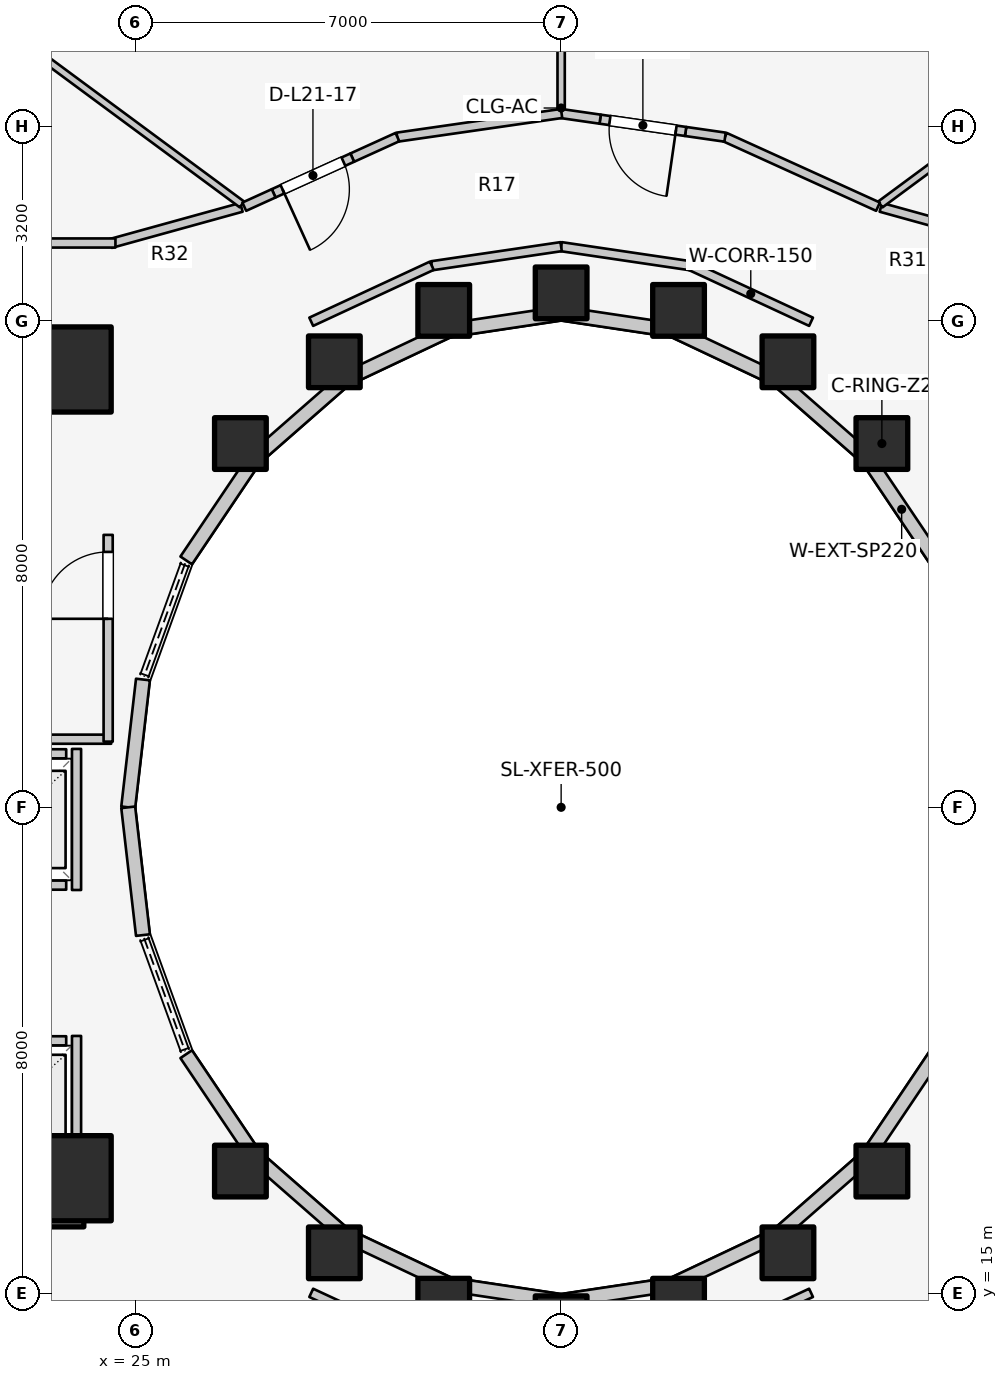
"""IFC4 building model, lengths in metres.
Left out: names, types, materials, properties, quantities, classifications, styles, units other than length and angle.
Written with IfcOpenShell. Run it as: python <this file> out.ifc"""

import sys

from ifc_helpers import new_model, si_unit, direction, frame, frame_2d, origin, origin_2d, place, context, subcontext, project, spatial, rectangle, extrude, element, fill, save


model = new_model("IFC4")
c1 = context("Model", 3, precision=1e-05, world=origin(), true_north=direction((0.0, 1.0)))
c2 = subcontext(c1, "Body", "Model", "MODEL_VIEW")
j1 = project(units=[si_unit("LENGTHUNIT", "METRE"), si_unit("PLANEANGLEUNIT", "RADIAN")], contexts=[c1])
p1 = place(None, origin())
s1 = spatial("IfcSite", under=j1, at=p1, CompositionType="ELEMENT")
p2 = place(p1, origin())
s2 = spatial("IfcBuilding", under=s1, at=p2, CompositionType="ELEMENT")
p3 = place(p2, frame((0.0, 0.0, 73.2)))
s3 = spatial("IfcBuildingStorey", under=s2, at=p3, CompositionType="ELEMENT", Elevation=73.2)
for number, where, z_axis, x_axis in (
    (1, (19.65, 16.55, 0.0), (0.0, 0.0, 1.0), (1.0, 0.0, 0.0)),
    (2, (19.65, 30.35, 0.0), (0.0, 0.0, 1.0), (1.0, 0.0, 0.0)),
):
    element("IfcWall", number, at=place(p3, frame(where, z_axis=z_axis, x_axis=x_axis)), inside=s3, PredefinedType="SHEAR", context=c2, shape_type="SweptSolid", body=[
        extrude(rectangle(XDim=4.5, YDim=0.9, at=frame_2d((2.25, 0.0))), origin(), (0.0, 0.0, 1.0), 3.1),
    ])
for number, where, z_axis, x_axis in (
    (3, (23.9, 16.9, 0.0), (0.0, 0.0, 1.0), (1.0, 0.0, 0.0)),
    (4, (23.9, 30.2, 0.0), (0.0, 0.0, 1.0), (1.0, 0.0, 0.0)),
):
    element("IfcColumn", number, at=place(p3, frame(where, z_axis=z_axis, x_axis=x_axis)), inside=s3, PredefinedType="COLUMN", context=c2, shape_type="SweptSolid", body=[
        extrude(rectangle(XDim=1.4, YDim=1.4, at=origin_2d()), origin(), (0.0, 0.0, 1.0), 3.1),
    ])
for number, where, z_axis, x_axis in (
    (5, (37.275, 28.982, 0.0), (0.0, 0.0, 1.0), (1.0, 0.0, 0.0)),
    (6, (35.73, 30.327, 0.0), (0.0, 0.0, 1.0), (1.0, 0.0, 0.0)),
    (7, (33.931, 31.172, 0.0), (0.0, 0.0, 1.0), (1.0, 0.0, 0.0)),
    (8, (32.0, 31.46, 0.0), (0.0, 0.0, 1.0), (1.0, 0.0, 0.0)),
    (9, (30.069, 31.172, 0.0), (0.0, 0.0, 1.0), (1.0, 0.0, 0.0)),
    (10, (28.27, 30.327, 0.0), (0.0, 0.0, 1.0), (1.0, 0.0, 0.0)),
    (11, (26.725, 28.982, 0.0), (0.0, 0.0, 1.0), (1.0, 0.0, 0.0)),
    (12, (26.725, 17.018, 0.0), (0.0, 0.0, 1.0), (1.0, 0.0, 0.0)),
    (13, (28.27, 15.673, 0.0), (0.0, 0.0, 1.0), (1.0, 0.0, 0.0)),
    (14, (30.069, 14.828, 0.0), (0.0, 0.0, 1.0), (1.0, 0.0, 0.0)),
    (15, (32.0, 14.54, 0.0), (0.0, 0.0, 1.0), (1.0, 0.0, 0.0)),
    (16, (33.931, 14.828, 0.0), (0.0, 0.0, 1.0), (1.0, 0.0, 0.0)),
    (17, (35.73, 15.673, 0.0), (0.0, 0.0, 1.0), (1.0, 0.0, 0.0)),
    (18, (37.275, 17.018, 0.0), (0.0, 0.0, 1.0), (1.0, 0.0, 0.0)),
):
    element("IfcColumn", number, at=place(p3, frame(where, z_axis=z_axis, x_axis=x_axis)), inside=s3, PredefinedType="COLUMN", context=c2, shape_type="SweptSolid", body=[
        extrude(rectangle(XDim=0.85, YDim=0.85, at=origin_2d()), origin(), (0.0, 0.0, 1.0), 3.1),
    ])
p4 = place(p3, frame((38.166, 27.06, 0.0), z_axis=(0.0, 0.0, 1.0), x_axis=(-0.558197800898, 0.829707909492, 0.0)))
e19 = element("IfcWall", 19, at=p4, inside=s3, PredefinedType="STANDARD", context=c2, shape_type="SweptSolid", body=[
    extrude(rectangle(XDim=2.027, YDim=0.23, at=frame_2d((1.013, 0.0))), origin(), (0.0, 0.0, 1.0), 1.22),
])
p5 = place(p3, frame((37.035, 28.742, 0.0), z_axis=(0.0, 0.0, 1.0), x_axis=(-0.752576694707, 0.658504607869, 0.0)))
e20 = element("IfcWall", 20, at=p5, inside=s3, PredefinedType="STANDARD", context=c2, shape_type="SweptSolid", body=[
    extrude(rectangle(XDim=1.959, YDim=0.23, at=frame_2d((0.98, 0.0))), origin(), (0.0, 0.0, 1.0), 1.22),
])
p6 = place(p3, frame((35.56, 30.032, 0.0), z_axis=(0.0, 0.0, 1.0), x_axis=(-0.904179699603, 0.427152280606, 0.0)))
e21 = element("IfcWall", 21, at=p6, inside=s3, PredefinedType="STANDARD", context=c2, shape_type="SweptSolid", body=[
    extrude(rectangle(XDim=1.899, YDim=0.23, at=frame_2d((0.95, 0.0))), origin(), (0.0, 0.0, 1.0), 1.22),
])
for number, where, z_axis, x_axis in (
    (22, (33.843, 30.843, 0.0), (0.0, 0.0, 1.0), (-0.989, 0.149, 0.0)),
    (23, (32.0, 31.12, 0.0), (0.0, 0.0, 1.0), (-0.989, -0.149, 0.0)),
):
    element("IfcWall", number, at=place(p3, frame(where, z_axis=z_axis, x_axis=x_axis)), inside=s3, PredefinedType="STANDARD", context=c2, shape_type="SweptSolid", body=[
        extrude(rectangle(XDim=1.864, YDim=0.23, at=frame_2d((0.932, 0.0))), origin(), (0.0, 0.0, 1.0), 1.22),
    ])
p7 = place(p3, frame((30.157, 30.843, 0.0), z_axis=(0.0, 0.0, 1.0), x_axis=(-0.904179699603, -0.427152280606, 0.0)))
e24 = element("IfcWall", 24, at=p7, inside=s3, PredefinedType="STANDARD", context=c2, shape_type="SweptSolid", body=[
    extrude(rectangle(XDim=1.899, YDim=0.23, at=frame_2d((0.95, 0.0))), origin(), (0.0, 0.0, 1.0), 1.22),
])
p8 = place(p3, frame((28.44, 30.032, 0.0), z_axis=(0.0, 0.0, 1.0), x_axis=(-0.752576694707, -0.658504607869, 0.0)))
e25 = element("IfcWall", 25, at=p8, inside=s3, PredefinedType="STANDARD", context=c2, shape_type="SweptSolid", body=[
    extrude(rectangle(XDim=1.959, YDim=0.23, at=frame_2d((0.98, 0.0))), origin(), (0.0, 0.0, 1.0), 1.22),
])
p9 = place(p3, frame((26.965, 28.742, 0.0), z_axis=(0.0, 0.0, 1.0), x_axis=(-0.558197800898, -0.829707909492, 0.0)))
e26 = element("IfcWall", 26, at=p9, inside=s3, PredefinedType="STANDARD", context=c2, shape_type="SweptSolid", body=[
    extrude(rectangle(XDim=2.027, YDim=0.23, at=frame_2d((1.013, 0.0))), origin(), (0.0, 0.0, 1.0), 1.22),
])
for number, where, z_axis, x_axis in (
    (27, (25.123, 25.102, 0.0), (0.0, 0.0, 1.0), (-0.115, -0.993, 0.0)),
    (28, (24.88, 23.0, 0.0), (0.0, 0.0, 1.0), (0.115, -0.993, 0.0)),
):
    element("IfcWall", number, at=place(p3, frame(where, z_axis=z_axis, x_axis=x_axis)), inside=s3, PredefinedType="STANDARD", context=c2, shape_type="SweptSolid", body=[
        extrude(rectangle(XDim=2.115, YDim=0.23, at=frame_2d((1.058, 0.0))), origin(), (0.0, 0.0, 1.0), 2.56),
    ])
p10 = place(p3, frame((25.834, 18.94, 0.0), z_axis=(0.0, 0.0, 1.0), x_axis=(0.558197800898, -0.829707909492, 0.0)))
e29 = element("IfcWall", 29, at=p10, inside=s3, PredefinedType="STANDARD", context=c2, shape_type="SweptSolid", body=[
    extrude(rectangle(XDim=2.027, YDim=0.23, at=frame_2d((1.013, 0.0))), origin(), (0.0, 0.0, 1.0), 1.22),
])
p11 = place(p3, frame((26.965, 17.258, 0.0), z_axis=(0.0, 0.0, 1.0), x_axis=(0.752576694707, -0.658504607869, 0.0)))
e30 = element("IfcWall", 30, at=p11, inside=s3, PredefinedType="STANDARD", context=c2, shape_type="SweptSolid", body=[
    extrude(rectangle(XDim=1.959, YDim=0.23, at=frame_2d((0.98, 0.0))), origin(), (0.0, 0.0, 1.0), 1.22),
])
p12 = place(p3, frame((28.44, 15.968, 0.0), z_axis=(0.0, 0.0, 1.0), x_axis=(0.904179699603, -0.427152280606, 0.0)))
e31 = element("IfcWall", 31, at=p12, inside=s3, PredefinedType="STANDARD", context=c2, shape_type="SweptSolid", body=[
    extrude(rectangle(XDim=1.899, YDim=0.23, at=frame_2d((0.95, 0.0))), origin(), (0.0, 0.0, 1.0), 1.22),
])
for number, where, z_axis, x_axis in (
    (32, (30.157, 15.157, 0.0), (0.0, 0.0, 1.0), (0.989, -0.149, 0.0)),
    (33, (32.0, 14.88, 0.0), (0.0, 0.0, 1.0), (0.989, 0.149, 0.0)),
):
    element("IfcWall", number, at=place(p3, frame(where, z_axis=z_axis, x_axis=x_axis)), inside=s3, PredefinedType="STANDARD", context=c2, shape_type="SweptSolid", body=[
        extrude(rectangle(XDim=1.864, YDim=0.23, at=frame_2d((0.932, 0.0))), origin(), (0.0, 0.0, 1.0), 1.22),
    ])
p13 = place(p3, frame((33.843, 15.157, 0.0), z_axis=(0.0, 0.0, 1.0), x_axis=(0.904179699603, 0.427152280606, 0.0)))
e34 = element("IfcWall", 34, at=p13, inside=s3, PredefinedType="STANDARD", context=c2, shape_type="SweptSolid", body=[
    extrude(rectangle(XDim=1.899, YDim=0.23, at=frame_2d((0.95, 0.0))), origin(), (0.0, 0.0, 1.0), 1.22),
])
p14 = place(p3, frame((35.56, 15.968, 0.0), z_axis=(0.0, 0.0, 1.0), x_axis=(0.752576694707, 0.658504607869, 0.0)))
e35 = element("IfcWall", 35, at=p14, inside=s3, PredefinedType="STANDARD", context=c2, shape_type="SweptSolid", body=[
    extrude(rectangle(XDim=1.959, YDim=0.23, at=frame_2d((0.98, 0.0))), origin(), (0.0, 0.0, 1.0), 1.22),
])
p15 = place(p3, frame((37.035, 17.258, 0.0), z_axis=(0.0, 0.0, 1.0), x_axis=(0.558197800898, 0.829707909492, 0.0)))
e36 = element("IfcWall", 36, at=p15, inside=s3, PredefinedType="STANDARD", context=c2, shape_type="SweptSolid", body=[
    extrude(rectangle(XDim=2.027, YDim=0.23, at=frame_2d((1.013, 0.0))), origin(), (0.0, 0.0, 1.0), 1.22),
])
p16 = place(p3, frame((22.04, 19.16, 0.0), z_axis=(0.0, 0.0, 1.0), x_axis=(1.0, 0.0, 0.0)))
e37 = element("IfcWall", 37, at=p16, inside=s3, PredefinedType="SOLIDWALL", context=c2, shape_type="SweptSolid", body=[
    extrude(rectangle(XDim=1.82, YDim=0.15, at=frame_2d((0.91, 0.0))), origin(), (0.0, 0.0, 1.0), 2.12),
])
p17 = place(p16, frame((0.36, 0.0, 0.0)))
e38 = element("IfcOpeningElement", 38, at=p17, cuts=e37, PredefinedType="OPENING", context=c2, shape_type="SweptSolid", body=[
    extrude(rectangle(XDim=1.1, YDim=2.1, at=frame_2d((0.55, 1.05))), frame((0.0, 0.085, 0.0), z_axis=(0.0, -1.0, 0.0), x_axis=(1.0, 0.0, 0.0)), (0.0, 0.0, 1.0), 0.17),
])
p18 = place(p3, frame((22.04, 17.1, 0.0), z_axis=(0.0, 0.0, 1.0), x_axis=(1.0, 0.0, 0.0)))
e39 = element("IfcWall", 39, at=p18, inside=s3, PredefinedType="SOLIDWALL", context=c2, shape_type="SweptSolid", body=[
    extrude(rectangle(XDim=1.82, YDim=0.15, at=frame_2d((0.91, 0.0))), origin(), (0.0, 0.0, 1.0), 2.12),
])
p19 = place(p3, frame((24.03, 17.02, 0.0), z_axis=(0.0, 0.0, 1.0), x_axis=(0.0, 1.0, 0.0)))
e40 = element("IfcWall", 40, at=p19, inside=s3, PredefinedType="SOLIDWALL", context=c2, shape_type="SweptSolid", body=[
    extrude(rectangle(XDim=2.22, YDim=0.15, at=frame_2d((1.11, 0.0))), origin(), (0.0, 0.0, 1.0), 1.873),
])
p20 = place(p3, frame((22.04, 21.72, 0.0), z_axis=(0.0, 0.0, 1.0), x_axis=(1.0, 0.0, 0.0)))
e41 = element("IfcWall", 41, at=p20, inside=s3, PredefinedType="SOLIDWALL", context=c2, shape_type="SweptSolid", body=[
    extrude(rectangle(XDim=1.82, YDim=0.15, at=frame_2d((0.91, 0.0))), origin(), (0.0, 0.0, 1.0), 2.12),
])
p21 = place(p20, frame((0.36, 0.0, 0.0)))
e42 = element("IfcOpeningElement", 42, at=p21, cuts=e41, PredefinedType="OPENING", context=c2, shape_type="SweptSolid", body=[
    extrude(rectangle(XDim=1.1, YDim=2.1, at=frame_2d((0.55, 1.05))), frame((0.0, 0.085, 0.0), z_axis=(0.0, -1.0, 0.0), x_axis=(1.0, 0.0, 0.0)), (0.0, 0.0, 1.0), 0.17),
])
p22 = place(p3, frame((22.04, 23.88, 0.0), z_axis=(0.0, 0.0, 1.0), x_axis=(1.0, 0.0, 0.0)))
e43 = element("IfcWall", 43, at=p22, inside=s3, PredefinedType="SOLIDWALL", context=c2, shape_type="SweptSolid", body=[
    extrude(rectangle(XDim=1.82, YDim=0.15, at=frame_2d((0.91, 0.0))), origin(), (0.0, 0.0, 1.0), 2.12),
])
p23 = place(p3, frame((24.03, 21.64, 0.0), z_axis=(0.0, 0.0, 1.0), x_axis=(0.0, 1.0, 0.0)))
e44 = element("IfcWall", 44, at=p23, inside=s3, PredefinedType="SOLIDWALL", context=c2, shape_type="SweptSolid", body=[
    extrude(rectangle(XDim=2.32, YDim=0.15, at=frame_2d((1.16, 0.0))), origin(), (0.0, 0.0, 1.0), 2.12),
])
p24 = place(p3, frame((19.52, 24.12, 0.0), z_axis=(0.0, 0.0, 1.0), x_axis=(1.0, 0.0, 0.0)))
e45 = element("IfcWall", 45, at=p24, inside=s3, PredefinedType="PARTITIONING", context=c2, shape_type="SweptSolid", body=[
    extrude(rectangle(XDim=5.08, YDim=0.15, at=frame_2d((2.54, 0.0))), origin(), (0.0, 0.0, 1.0), 2.12),
])
p25 = place(p3, frame((24.55, 24.08, 0.0), z_axis=(0.0, 0.0, 1.0), x_axis=(0.0, 1.0, 0.0)))
e46 = element("IfcWall", 46, at=p25, inside=s3, PredefinedType="PARTITIONING", context=c2, shape_type="SweptSolid", body=[
    extrude(rectangle(XDim=3.4, YDim=0.15, at=frame_2d((1.7, 0.0))), origin(), (0.0, 0.0, 1.0), 2.575),
])
p26 = place(p25, frame((2.02, 0.0, 0.0)))
e47 = element("IfcOpeningElement", 47, at=p26, cuts=e46, PredefinedType="OPENING", context=c2, shape_type="SweptSolid", body=[
    extrude(rectangle(XDim=1.1, YDim=2.1, at=frame_2d((0.55, 1.05))), frame((0.0, 0.085, 0.0), z_axis=(0.0, -1.0, 0.0), x_axis=(1.0, 0.0, 0.0)), (0.0, 0.0, 1.0), 0.17),
])
p27 = place(p3, frame((36.11, 30.985, 0.0), z_axis=(0.0, 0.0, 1.0), x_axis=(-0.906943449489, 0.421252393975, 0.0)))
e48 = element("IfcWall", 48, at=p27, inside=s3, PredefinedType="PARTITIONING", context=c2, shape_type="SweptSolid", body=[
    extrude(rectangle(XDim=2.186, YDim=0.15, at=frame_2d((1.093, 0.0))), origin(), (0.0, 0.0, 1.0), 1.992),
])
for number, where, z_axis, x_axis in (
    (49, (34.127, 31.906, 0.0), (0.0, 0.0, 1.0), (-0.989, 0.146, 0.0)),
    (50, (32.0, 32.22, 0.0), (0.0, 0.0, 1.0), (-0.989, -0.146, 0.0)),
):
    element("IfcWall", number, at=place(p3, frame(where, z_axis=z_axis, x_axis=x_axis)), inside=s3, PredefinedType="PARTITIONING", context=c2, shape_type="SweptSolid", body=[
        extrude(rectangle(XDim=2.151, YDim=0.15, at=frame_2d((1.075, 0.0))), origin(), (0.0, 0.0, 1.0), 1.992),
    ])
p28 = place(p3, frame((29.873, 31.906, 0.0), z_axis=(0.0, 0.0, 1.0), x_axis=(-0.906943449489, -0.421252393975, 0.0)))
e51 = element("IfcWall", 51, at=p28, inside=s3, PredefinedType="PARTITIONING", context=c2, shape_type="SweptSolid", body=[
    extrude(rectangle(XDim=2.186, YDim=0.15, at=frame_2d((1.093, 0.0))), origin(), (0.0, 0.0, 1.0), 1.992),
])
for number, where, z_axis, x_axis in (
    (52, (27.89, 15.015, 0.0), (0.0, 0.0, 1.0), (0.907, -0.421, 0.0)),
    (53, (34.127, 14.094, 0.0), (0.0, 0.0, 1.0), (0.907, 0.421, 0.0)),
):
    element("IfcWall", number, at=place(p3, frame(where, z_axis=z_axis, x_axis=x_axis)), inside=s3, PredefinedType="PARTITIONING", context=c2, shape_type="SweptSolid", body=[
        extrude(rectangle(XDim=2.186, YDim=0.15, at=frame_2d((1.093, 0.0))), origin(), (0.0, 0.0, 1.0), 1.22),
    ])
for number, where, z_axis, x_axis in (
    (54, (37.258, 32.867, 0.0), (0.0, 0.0, 1.0), (0.964, -0.267, 0.0)),
    (55, (26.742, 32.867, 0.0), (0.0, 0.0, 1.0), (-0.964, -0.267, 0.0)),
):
    element("IfcWall", number, at=place(p3, frame(where, z_axis=z_axis, x_axis=x_axis)), inside=s3, PredefinedType="PARTITIONING", context=c2, shape_type="SweptSolid", body=[
        extrude(rectangle(XDim=2.232, YDim=0.15, at=frame_2d((1.116, 0.0))), origin(), (0.0, 0.0, 1.0), 1.992),
    ])
p29 = place(p3, frame((19.51, 32.28, 0.0), z_axis=(0.0, 0.0, 1.0), x_axis=(1.0, 0.0, 0.0)))
e56 = element("IfcWall", 56, at=p29, inside=s3, PredefinedType="PARTITIONING", context=c2, shape_type="SweptSolid", body=[
    extrude(rectangle(XDim=5.16, YDim=0.15, at=frame_2d((2.58, 0.0))), origin(), (0.0, 0.0, 1.0), 1.992),
])
p30 = place(p3, frame((37.249, 32.914, 0.0), z_axis=(0.0, 0.0, 1.0), x_axis=(0.80430981394, 0.594210167533, 0.0)))
e57 = element("IfcWall", 57, at=p30, inside=s3, PredefinedType="MOVABLE", context=c2, shape_type="SweptSolid", body=[
    extrude(rectangle(XDim=9.146, YDim=0.12, at=frame_2d((4.573, 0.0))), origin(), (0.0, 0.0, 1.0), 1.22),
])
p31 = place(p3, frame((32.0, 34.465, 0.0), z_axis=(0.0, 0.0, 1.0), x_axis=(0.0, 1.0, 0.0)))
e58 = element("IfcWall", 58, at=p31, inside=s3, PredefinedType="MOVABLE", context=c2, shape_type="SweptSolid", body=[
    extrude(rectangle(XDim=6.91, YDim=0.12, at=frame_2d((3.455, 0.0))), origin(), (0.0, 0.0, 1.0), 1.22),
])
p32 = place(p3, frame((26.751, 32.914, 0.0), z_axis=(0.0, 0.0, 1.0), x_axis=(-0.80430981394, 0.594210167533, 0.0)))
e59 = element("IfcWall", 59, at=p32, inside=s3, PredefinedType="MOVABLE", context=c2, shape_type="SweptSolid", body=[
    extrude(rectangle(XDim=9.146, YDim=0.12, at=frame_2d((4.573, 0.0))), origin(), (0.0, 0.0, 1.0), 1.22),
])
p33 = place(p3, frame((37.211, 32.877, 0.0), z_axis=(0.0, 0.0, 1.0), x_axis=(-0.910435980343, 0.413650003865, 0.0)))
e60 = element("IfcWall", 60, at=p33, inside=s3, PredefinedType="PARTITIONING", context=c2, shape_type="SweptSolid", body=[
    extrude(rectangle(XDim=2.766, YDim=0.15, at=frame_2d((1.383, 0.0))), origin(), (0.0, 0.0, 1.0), 1.992),
])
p34 = place(p3, frame((34.696, 34.021, 0.0), z_axis=(0.0, 0.0, 1.0), x_axis=(-0.989829975321, 0.142255474256, 0.0)))
e61 = element("IfcWall", 61, at=p34, inside=s3, PredefinedType="PARTITIONING", context=c2, shape_type="SweptSolid", body=[
    extrude(rectangle(XDim=0.656, YDim=0.15, at=frame_2d((0.328, 0.0))), origin(), (0.0, 0.0, 1.0), 2.575),
])
p35 = place(p3, frame((34.047, 34.114, 0.0), z_axis=(0.0, 0.0, 1.0), x_axis=(-0.98979070052, 0.142528485449, 0.0)))
e62 = element("IfcWall", 62, at=p35, inside=s3, PredefinedType="PARTITIONING", context=c2, shape_type="SweptSolid", body=[
    extrude(rectangle(XDim=1.42, YDim=0.15, at=frame_2d((0.71, 0.0))), origin(), (0.0, 0.0, 1.0), 2.575),
])
p36 = place(p35, frame((0.16, 0.0, 0.0)))
e63 = element("IfcOpeningElement", 63, at=p36, cuts=e62, PredefinedType="OPENING", context=c2, shape_type="SweptSolid", body=[
    extrude(rectangle(XDim=1.1, YDim=2.1, at=frame_2d((0.55, 1.05))), frame((0.0, 0.085, 0.0), z_axis=(0.0, -1.0, 0.0), x_axis=(1.0, 0.0, 0.0)), (0.0, 0.0, 1.0), 0.17),
])
p37 = place(p3, frame((32.642, 34.316, 0.0), z_axis=(0.0, 0.0, 1.0), x_axis=(-0.989777474181, 0.142620305723, 0.0)))
e64 = element("IfcWall", 64, at=p37, inside=s3, PredefinedType="PARTITIONING", context=c2, shape_type="SweptSolid", body=[
    extrude(rectangle(XDim=0.656, YDim=0.15, at=frame_2d((0.328, 0.0))), origin(), (0.0, 0.0, 1.0), 1.992),
])
p38 = place(p3, frame((32.007, 34.41, 0.0), z_axis=(0.0, 0.0, 1.0), x_axis=(-0.989796962007, -0.142484995705, 0.0)))
e65 = element("IfcWall", 65, at=p38, inside=s3, PredefinedType="PARTITIONING", context=c2, shape_type="SweptSolid", body=[
    extrude(rectangle(XDim=2.731, YDim=0.15, at=frame_2d((1.366, 0.0))), origin(), (0.0, 0.0, 1.0), 1.992),
])
p39 = place(p3, frame((29.307, 34.022, 0.0), z_axis=(0.0, 0.0, 1.0), x_axis=(-0.910335729505, -0.413870583138, 0.0)))
e66 = element("IfcWall", 66, at=p39, inside=s3, PredefinedType="PARTITIONING", context=c2, shape_type="SweptSolid", body=[
    extrude(rectangle(XDim=0.816, YDim=0.15, at=frame_2d((0.408, 0.0))), origin(), (0.0, 0.0, 1.0), 1.992),
])
p40 = place(p3, frame((28.565, 33.684, 0.0), z_axis=(0.0, 0.0, 1.0), x_axis=(-0.910513615737, -0.413479087207, 0.0)))
e67 = element("IfcWall", 67, at=p40, inside=s3, PredefinedType="PARTITIONING", context=c2, shape_type="SweptSolid", body=[
    extrude(rectangle(XDim=1.42, YDim=0.15, at=frame_2d((0.71, 0.0))), origin(), (0.0, 0.0, 1.0), 2.16),
])
p41 = place(p40, frame((0.16, 0.0, 0.0)))
e68 = element("IfcOpeningElement", 68, at=p41, cuts=e67, PredefinedType="OPENING", context=c2, shape_type="SweptSolid", body=[
    extrude(rectangle(XDim=1.1, YDim=2.1, at=frame_2d((0.55, 1.05))), frame((0.0, 0.085, 0.0), z_axis=(0.0, -1.0, 0.0), x_axis=(1.0, 0.0, 0.0)), (0.0, 0.0, 1.0), 0.17),
])
p42 = place(p3, frame((27.272, 33.097, 0.0), z_axis=(0.0, 0.0, 1.0), x_axis=(-0.910382238922, -0.413768267336, 0.0)))
e69 = element("IfcWall", 69, at=p42, inside=s3, PredefinedType="PARTITIONING", context=c2, shape_type="SweptSolid", body=[
    extrude(rectangle(XDim=0.531, YDim=0.15, at=frame_2d((0.265, 0.0))), origin(), (0.0, 0.0, 1.0), 2.575),
])
p43 = place(p26, origin())
e70 = element("IfcDoor", 70, at=p43, inside=s3, OperationType="SINGLE_SWING_LEFT", PredefinedType="DOOR", context=c2, shape_type="SweptSolid", body=[
    extrude(rectangle(XDim=1.1, YDim=2.1, at=frame_2d((0.55, 1.05))), frame((0.0, 0.025, 0.0), z_axis=(0.0, -1.0, 0.0), x_axis=(1.0, 0.0, 0.0)), (0.0, 0.0, 1.0), 0.05),
])
fill(e47, e70)
p44 = place(p36, origin())
e71 = element("IfcDoor", 71, at=p44, inside=s3, OperationType="SINGLE_SWING_LEFT", PredefinedType="DOOR", context=c2, shape_type="SweptSolid", body=[
    extrude(rectangle(XDim=1.1, YDim=2.1, at=frame_2d((0.55, 1.05))), frame((0.0, 0.025, 0.0), z_axis=(0.0, -1.0, 0.0), x_axis=(1.0, 0.0, 0.0)), (0.0, 0.0, 1.0), 0.05),
])
fill(e63, e71)
p45 = place(p41, origin())
e72 = element("IfcDoor", 72, at=p45, inside=s3, OperationType="SINGLE_SWING_RIGHT", PredefinedType="DOOR", context=c2, shape_type="SweptSolid", body=[
    extrude(rectangle(XDim=1.1, YDim=2.1, at=frame_2d((0.55, 1.05))), frame((0.0, 0.025, 0.0), z_axis=(0.0, -1.0, 0.0), x_axis=(1.0, 0.0, 0.0)), (0.0, 0.0, 1.0), 0.05),
])
fill(e68, e72)
save(model, sys.argv[1])
